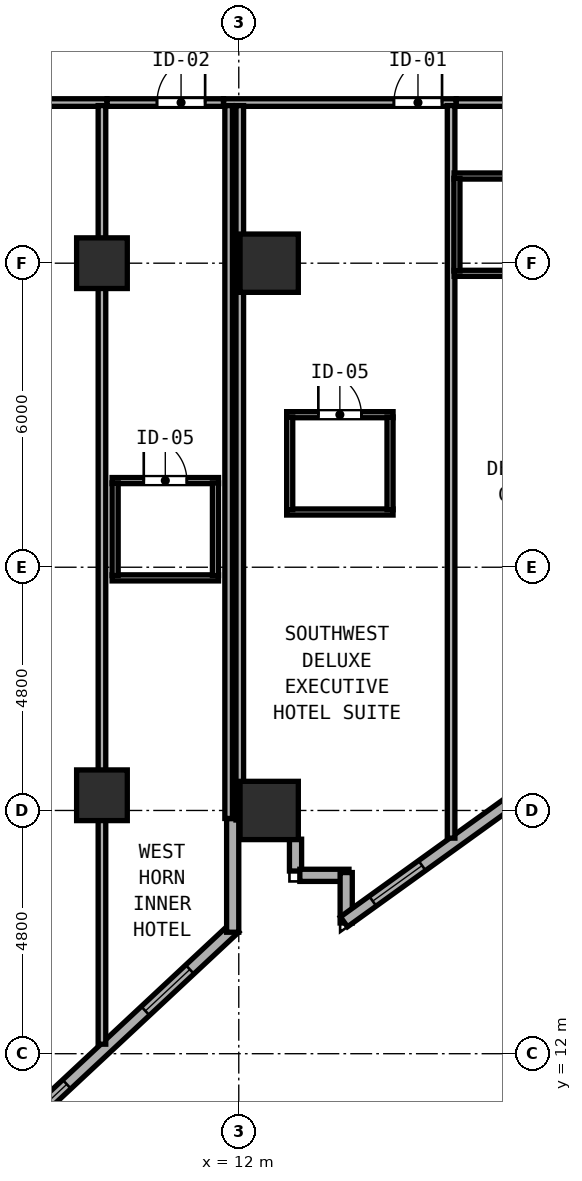
"""IFC4 building model, lengths in metres.
Left out: names, types, materials, properties, quantities, classifications, styles, units other than length and angle.
Written with IfcOpenShell. Run it as: python <this file> out.ifc"""

import sys

from ifc_helpers import new_model, si_unit, direction, frame, frame_2d, origin, origin_2d, place, context, subcontext, project, spatial, rectangle, hollow_rectangle, extrude, element, fill, save


model = new_model("IFC4")
c1 = context("Model", 3, precision=1e-05, world=origin(), true_north=direction((0.0, 1.0)))
c2 = subcontext(c1, "Body", "Model", "MODEL_VIEW")
j1 = project(units=[si_unit("LENGTHUNIT", "METRE"), si_unit("PLANEANGLEUNIT", "RADIAN")], contexts=[c1])
p1 = place(None, origin())
s1 = spatial("IfcSite", under=j1, at=p1, CompositionType="ELEMENT")
p2 = place(p1, origin())
s2 = spatial("IfcBuilding", under=s1, at=p2, CompositionType="ELEMENT")
p3 = place(p2, frame((0.0, 0.0, 81.8)))
s3 = spatial("IfcBuildingStorey", under=s2, at=p3, CompositionType="ELEMENT", Elevation=81.8)
for number, where, z_axis, x_axis in (
    (1, (12.6, 16.8, 0.0), (0.0, 0.0, 1.0), (1.0, 0.0, 0.0)),
    (2, (12.6, 27.6, 0.0), (0.0, 0.0, 1.0), (1.0, 0.0, 0.0)),
):
    element("IfcColumn", number, at=place(p3, frame(where, z_axis=z_axis, x_axis=x_axis)), inside=s3, PredefinedType="COLUMN", context=c2, shape_type="SweptSolid", body=[
        extrude(hollow_rectangle(XDim=1.15, YDim=1.15, WallThickness=0.042, at=origin_2d()), origin(), (0.0, 0.0, 1.0), 3.8),
    ])
for number, where, z_axis, x_axis in (
    (3, (9.3, 17.1, 0.0), (0.0, 0.0, 1.0), (1.0, 0.0, 0.0)),
    (4, (9.3, 27.6, 0.0), (0.0, 0.0, 1.0), (1.0, 0.0, 0.0)),
):
    element("IfcColumn", number, at=place(p3, frame(where, z_axis=z_axis, x_axis=x_axis)), inside=s3, PredefinedType="COLUMN", context=c2, shape_type="SweptSolid", body=[
        extrude(hollow_rectangle(XDim=1.0, YDim=1.0, WallThickness=0.038, at=origin_2d()), origin(), (0.0, 0.0, 1.0), 3.8),
    ])
p4 = place(p3, frame((3.27, 6.416, 0.0), z_axis=(0.0, 0.0, 1.0), x_axis=(0.731064187858, 0.682308693505, 0.0)))
e5 = element("IfcWall", 5, at=p4, inside=s3, PredefinedType="SOLIDWALL", context=c2, shape_type="SweptSolid", body=[
    extrude(rectangle(XDim=11.833, YDim=0.24, at=frame_2d((5.916, 0.0))), origin(), (0.0, 0.0, 1.0), 3.6),
])
p5 = place(p4, frame((0.7, 0.0, 0.85)))
e6 = element("IfcOpeningElement", 6, at=p5, cuts=e5, PredefinedType="OPENING", context=c2, shape_type="SweptSolid", body=[
    extrude(rectangle(XDim=1.2, YDim=1.85, at=frame_2d((0.6, 0.925))), frame((0.0, 0.13, 0.0), z_axis=(0.0, -1.0, 0.0), x_axis=(1.0, 0.0, 0.0)), (0.0, 0.0, 1.0), 0.26),
])
p6 = place(p4, frame((6.1, 0.0, 0.85)))
e7 = element("IfcOpeningElement", 7, at=p6, cuts=e5, PredefinedType="OPENING", context=c2, shape_type="SweptSolid", body=[
    extrude(rectangle(XDim=1.2, YDim=1.85, at=frame_2d((0.6, 0.925))), frame((0.0, 0.13, 0.0), z_axis=(0.0, -1.0, 0.0), x_axis=(1.0, 0.0, 0.0)), (0.0, 0.0, 1.0), 0.26),
])
p7 = place(p4, frame((9.421, 0.0, 0.85)))
e8 = element("IfcOpeningElement", 8, at=p7, cuts=e5, PredefinedType="OPENING", context=c2, shape_type="SweptSolid", body=[
    extrude(rectangle(XDim=1.2, YDim=1.85, at=frame_2d((0.6, 0.925))), frame((0.0, 0.13, 0.0), z_axis=(0.0, -1.0, 0.0), x_axis=(1.0, 0.0, 0.0)), (0.0, 0.0, 1.0), 0.26),
])
p8 = place(p3, frame((11.88, 14.397, 0.0), z_axis=(0.0, 0.0, 1.0), x_axis=(0.0, 1.0, 0.0)))
e9 = element("IfcWall", 9, at=p8, inside=s3, PredefinedType="SOLIDWALL", context=c2, shape_type="SweptSolid", body=[
    extrude(rectangle(XDim=2.243, YDim=0.24, at=frame_2d((1.121, 0.0))), origin(), (0.0, 0.0, 1.0), 3.6),
])
p9 = place(p3, frame((13.12, 16.233, 0.0), z_axis=(0.0, 0.0, 1.0), x_axis=(0.0, -1.0, 0.0)))
e10 = element("IfcWall", 10, at=p9, inside=s3, PredefinedType="SOLIDWALL", context=c2, shape_type="SweptSolid", body=[
    extrude(rectangle(XDim=0.628, YDim=0.24, at=frame_2d((0.314, 0.0))), origin(), (0.0, 0.0, 1.0), 3.6),
])
p10 = place(p3, frame((13.205, 15.52, 0.0), z_axis=(0.0, 0.0, 1.0), x_axis=(1.0, 0.0, 0.0)))
e11 = element("IfcWall", 11, at=p10, inside=s3, PredefinedType="SOLIDWALL", context=c2, shape_type="SweptSolid", body=[
    extrude(rectangle(XDim=0.97, YDim=0.24, at=frame_2d((0.485, 0.0))), origin(), (0.0, 0.0, 1.0), 3.6),
])
p11 = place(p3, frame((14.12, 15.575, 0.0), z_axis=(0.0, 0.0, 1.0), x_axis=(0.0, -1.0, 0.0)))
e12 = element("IfcWall", 12, at=p11, inside=s3, PredefinedType="SOLIDWALL", context=c2, shape_type="SweptSolid", body=[
    extrude(rectangle(XDim=0.996, YDim=0.24, at=frame_2d((0.498, 0.0))), origin(), (0.0, 0.0, 1.0), 3.6),
])
p12 = place(p3, frame((14.075, 14.602, 0.0), z_axis=(0.0, 0.0, 1.0), x_axis=(0.811543176492, 0.58429245476, 0.0)))
e13 = element("IfcWall", 13, at=p12, inside=s3, PredefinedType="SOLIDWALL", context=c2, shape_type="SweptSolid", body=[
    extrude(rectangle(XDim=11.531, YDim=0.24, at=frame_2d((5.765, 0.0))), origin(), (0.0, 0.0, 1.0), 3.097),
])
p13 = place(p12, frame((0.7, 0.0, 0.85)))
e14 = element("IfcOpeningElement", 14, at=p13, cuts=e13, PredefinedType="OPENING", context=c2, shape_type="SweptSolid", body=[
    extrude(rectangle(XDim=1.2, YDim=1.85, at=frame_2d((0.6, 0.925))), frame((0.0, 0.13, 0.0), z_axis=(0.0, -1.0, 0.0), x_axis=(1.0, 0.0, 0.0)), (0.0, 0.0, 1.0), 0.26),
])
p14 = place(p12, frame((6.1, 0.0, 0.85)))
e15 = element("IfcOpeningElement", 15, at=p14, cuts=e13, PredefinedType="OPENING", context=c2, shape_type="SweptSolid", body=[
    extrude(rectangle(XDim=1.2, YDim=1.85, at=frame_2d((0.6, 0.925))), frame((0.0, 0.13, 0.0), z_axis=(0.0, -1.0, 0.0), x_axis=(1.0, 0.0, 0.0)), (0.0, 0.0, 1.0), 0.26),
])
p15 = place(p12, frame((9.07, 0.0, 0.85)))
e16 = element("IfcOpeningElement", 16, at=p15, cuts=e13, PredefinedType="OPENING", context=c2, shape_type="SweptSolid", body=[
    extrude(rectangle(XDim=1.2, YDim=1.85, at=frame_2d((0.6, 0.925))), frame((0.0, 0.13, 0.0), z_axis=(0.0, -1.0, 0.0), x_axis=(1.0, 0.0, 0.0)), (0.0, 0.0, 1.0), 0.26),
])
p16 = place(p3, frame((12.173, 33.524, 0.0), z_axis=(0.0, 0.0, 1.0), x_axis=(-0.963197271032, -0.268795493036, 0.0)))
e17 = element("IfcWall", 17, at=p16, inside=s3, PredefinedType="SOLIDWALL", context=c2, shape_type="SweptSolid", body=[
    extrude(rectangle(XDim=9.095, YDim=0.24, at=frame_2d((4.548, 0.0))), origin(), (0.0, 0.0, 1.0), 3.6),
])
p17 = place(p16, frame((0.7, 0.0, 0.85)))
e18 = element("IfcOpeningElement", 18, at=p17, cuts=e17, PredefinedType="OPENING", context=c2, shape_type="SweptSolid", body=[
    extrude(rectangle(XDim=1.2, YDim=1.85, at=frame_2d((0.6, 0.925))), frame((0.0, 0.13, 0.0), z_axis=(0.0, -1.0, 0.0), x_axis=(1.0, 0.0, 0.0)), (0.0, 0.0, 1.0), 0.26),
])
p18 = place(p16, frame((6.1, 0.0, 0.85)))
e19 = element("IfcOpeningElement", 19, at=p18, cuts=e17, PredefinedType="OPENING", context=c2, shape_type="SweptSolid", body=[
    extrude(rectangle(XDim=1.2, YDim=1.85, at=frame_2d((0.6, 0.925))), frame((0.0, 0.13, 0.0), z_axis=(0.0, -1.0, 0.0), x_axis=(1.0, 0.0, 0.0)), (0.0, 0.0, 1.0), 0.26),
])
p19 = place(p3, frame((11.7, 30.77, 0.0), z_axis=(0.0, 0.0, 1.0), x_axis=(1.0, 0.0, 0.0)))
e20 = element("IfcWall", 20, at=p19, inside=s3, PredefinedType="PARTITIONING", context=c2, shape_type="SweptSolid", body=[
    extrude(rectangle(XDim=4.59, YDim=0.15, at=frame_2d((2.295, 0.0))), origin(), (0.0, 0.0, 1.0), 3.6),
])
p20 = place(p19, frame((4.311, 0.0, 0.0), z_axis=(0.0, 0.0, 1.0), x_axis=(-1.0, 0.0, 0.0)))
e21 = element("IfcOpeningElement", 21, at=p20, cuts=e20, PredefinedType="OPENING", context=c2, shape_type="SweptSolid", body=[
    extrude(rectangle(XDim=0.95, YDim=2.18, at=frame_2d((0.475, 1.09))), frame((0.0, 0.085, 0.0), z_axis=(0.0, -1.0, 0.0), x_axis=(1.0, 0.0, 0.0)), (0.0, 0.0, 1.0), 0.17),
])
p21 = place(p3, frame((11.8, 16.642, 0.0), z_axis=(0.0, 0.0, 1.0), x_axis=(0.0, 1.0, 0.0)))
e22 = element("IfcWall", 22, at=p21, inside=s3, PredefinedType="PARTITIONING", context=c2, shape_type="SweptSolid", body=[
    extrude(rectangle(XDim=14.068, YDim=0.15, at=frame_2d((7.034, 0.0))), origin(), (0.0, 0.0, 1.0), 3.6),
])
p22 = place(p3, frame((16.19, 16.254, 0.0), z_axis=(0.0, 0.0, 1.0), x_axis=(0.0, 1.0, 0.0)))
e23 = element("IfcWall", 23, at=p22, inside=s3, PredefinedType="PARTITIONING", context=c2, shape_type="SweptSolid", body=[
    extrude(rectangle(XDim=14.456, YDim=0.15, at=frame_2d((7.228, 0.0))), origin(), (0.0, 0.0, 1.0), 3.6),
])
p23 = place(p3, frame((12.945, 24.61, 0.0), z_axis=(0.0, 0.0, 1.0), x_axis=(1.0, 0.0, 0.0)))
e24 = element("IfcWall", 24, at=p23, inside=s3, PredefinedType="PARTITIONING", context=c2, shape_type="SweptSolid", body=[
    extrude(rectangle(XDim=2.1, YDim=0.12, at=frame_2d((1.05, 0.0))), origin(), (0.0, 0.0, 1.0), 3.6),
])
p24 = place(p23, frame((1.475, 0.0, 0.0), z_axis=(0.0, 0.0, 1.0), x_axis=(-1.0, 0.0, 0.0)))
e25 = element("IfcOpeningElement", 25, at=p24, cuts=e24, PredefinedType="OPENING", context=c2, shape_type="SweptSolid", body=[
    extrude(rectangle(XDim=0.85, YDim=2.1, at=frame_2d((0.425, 1.05))), frame((0.0, 0.07, 0.0), z_axis=(0.0, -1.0, 0.0), x_axis=(1.0, 0.0, 0.0)), (0.0, 0.0, 1.0), 0.14),
])
p25 = place(p3, frame((12.945, 22.69, 0.0), z_axis=(0.0, 0.0, 1.0), x_axis=(1.0, 0.0, 0.0)))
e26 = element("IfcWall", 26, at=p25, inside=s3, PredefinedType="PARTITIONING", context=c2, shape_type="SweptSolid", body=[
    extrude(rectangle(XDim=2.1, YDim=0.12, at=frame_2d((1.05, 0.0))), origin(), (0.0, 0.0, 1.0), 3.6),
])
for number, where, z_axis, x_axis in (
    (27, (13.005, 22.735, 0.0), (0.0, 0.0, 1.0), (0.0, 1.0, 0.0)),
    (28, (14.985, 22.735, 0.0), (0.0, 0.0, 1.0), (0.0, 1.0, 0.0)),
):
    element("IfcWall", number, at=place(p3, frame(where, z_axis=z_axis, x_axis=x_axis)), inside=s3, PredefinedType="PARTITIONING", context=c2, shape_type="SweptSolid", body=[
        extrude(rectangle(XDim=1.83, YDim=0.12, at=frame_2d((0.915, 0.0))), origin(), (0.0, 0.0, 1.0), 3.6),
    ])
p26 = place(p3, frame((16.292, 30.77, 0.0), z_axis=(0.0, 0.0, 1.0), x_axis=(1.0, 0.0, 0.0)))
e29 = element("IfcWall", 29, at=p26, inside=s3, PredefinedType="PARTITIONING", context=c2, shape_type="SweptSolid", body=[
    extrude(rectangle(XDim=4.148, YDim=0.15, at=frame_2d((2.074, 0.0))), origin(), (0.0, 0.0, 1.0), 3.6),
])
p27 = place(p26, frame((3.885, 0.0, 0.0), z_axis=(0.0, 0.0, 1.0), x_axis=(-1.0, 0.0, 0.0)))
e30 = element("IfcOpeningElement", 30, at=p27, cuts=e29, PredefinedType="OPENING", context=c2, shape_type="SweptSolid", body=[
    extrude(rectangle(XDim=0.95, YDim=2.15, at=frame_2d((0.475, 1.075))), frame((0.0, 0.085, 0.0), z_axis=(0.0, -1.0, 0.0), x_axis=(1.0, 0.0, 0.0)), (0.0, 0.0, 1.0), 0.17),
])
p28 = place(p3, frame((16.25, 29.32, 0.0), z_axis=(0.0, 0.0, 1.0), x_axis=(1.0, 0.0, 0.0)))
e31 = element("IfcWall", 31, at=p28, inside=s3, PredefinedType="PARTITIONING", context=c2, shape_type="SweptSolid", body=[
    extrude(rectangle(XDim=2.095, YDim=0.12, at=frame_2d((1.047, 0.0))), origin(), (0.0, 0.0, 1.0), 3.6),
])
p29 = place(p3, frame((16.25, 27.4, 0.0), z_axis=(0.0, 0.0, 1.0), x_axis=(1.0, 0.0, 0.0)))
e32 = element("IfcWall", 32, at=p29, inside=s3, PredefinedType="PARTITIONING", context=c2, shape_type="SweptSolid", body=[
    extrude(rectangle(XDim=2.095, YDim=0.12, at=frame_2d((1.047, 0.0))), origin(), (0.0, 0.0, 1.0), 3.097),
])
p30 = place(p3, frame((16.305, 27.445, 0.0), z_axis=(0.0, 0.0, 1.0), x_axis=(0.0, 1.0, 0.0)))
e33 = element("IfcWall", 33, at=p30, inside=s3, PredefinedType="PARTITIONING", context=c2, shape_type="SweptSolid", body=[
    extrude(rectangle(XDim=1.83, YDim=0.12, at=frame_2d((0.915, 0.0))), origin(), (0.0, 0.0, 1.0), 3.6),
])
p31 = place(p3, frame((3.311, 30.77, 0.0), z_axis=(0.0, 0.0, 1.0), x_axis=(1.0, 0.0, 0.0)))
e34 = element("IfcWall", 34, at=p31, inside=s3, PredefinedType="PARTITIONING", context=c2, shape_type="SweptSolid", body=[
    extrude(rectangle(XDim=6.089, YDim=0.15, at=frame_2d((3.044, 0.0))), origin(), (0.0, 0.0, 1.0), 3.6),
])
p32 = place(p31, frame((4.801, 0.0, 0.0), z_axis=(0.0, 0.0, 1.0), x_axis=(-1.0, 0.0, 0.0)))
e35 = element("IfcOpeningElement", 35, at=p32, cuts=e34, PredefinedType="OPENING", context=c2, shape_type="SweptSolid", body=[
    extrude(rectangle(XDim=0.95, YDim=2.18, at=frame_2d((0.475, 1.09))), frame((0.0, 0.085, 0.0), z_axis=(0.0, -1.0, 0.0), x_axis=(1.0, 0.0, 0.0)), (0.0, 0.0, 1.0), 0.17),
])
p33 = place(p3, frame((9.3, 12.188, 0.0), z_axis=(0.0, 0.0, 1.0), x_axis=(0.0, 1.0, 0.0)))
e36 = element("IfcWall", 36, at=p33, inside=s3, PredefinedType="PARTITIONING", context=c2, shape_type="SweptSolid", body=[
    extrude(rectangle(XDim=18.522, YDim=0.15, at=frame_2d((9.261, 0.0))), origin(), (0.0, 0.0, 1.0), 3.6),
])
p34 = place(p3, frame((9.402, 30.77, 0.0), z_axis=(0.0, 0.0, 1.0), x_axis=(1.0, 0.0, 0.0)))
e37 = element("IfcWall", 37, at=p34, inside=s3, PredefinedType="PARTITIONING", context=c2, shape_type="SweptSolid", body=[
    extrude(rectangle(XDim=2.296, YDim=0.15, at=frame_2d((1.148, 0.0))), origin(), (0.0, 0.0, 1.0), 3.6),
])
p35 = place(p34, frame((1.934, 0.0, 0.0), z_axis=(0.0, 0.0, 1.0), x_axis=(-1.0, 0.0, 0.0)))
e38 = element("IfcOpeningElement", 38, at=p35, cuts=e37, PredefinedType="OPENING", context=c2, shape_type="SweptSolid", body=[
    extrude(rectangle(XDim=0.95, YDim=2.15, at=frame_2d((0.475, 1.075))), frame((0.0, 0.085, 0.0), z_axis=(0.0, -1.0, 0.0), x_axis=(1.0, 0.0, 0.0)), (0.0, 0.0, 1.0), 0.17),
])
p36 = place(p3, frame((12.02, 16.612, 0.0), z_axis=(0.0, 0.0, 1.0), x_axis=(0.0, 1.0, 0.0)))
e39 = element("IfcWall", 39, at=p36, inside=s3, PredefinedType="PARTITIONING", context=c2, shape_type="SweptSolid", body=[
    extrude(rectangle(XDim=14.098, YDim=0.15, at=frame_2d((7.049, 0.0))), origin(), (0.0, 0.0, 1.0), 3.6),
])
p37 = place(p3, frame((9.5, 23.31, 0.0), z_axis=(0.0, 0.0, 1.0), x_axis=(1.0, 0.0, 0.0)))
e40 = element("IfcWall", 40, at=p37, inside=s3, PredefinedType="PARTITIONING", context=c2, shape_type="SweptSolid", body=[
    extrude(rectangle(XDim=2.1, YDim=0.12, at=frame_2d((1.05, 0.0))), origin(), (0.0, 0.0, 1.0), 3.6),
])
p38 = place(p37, frame((1.475, 0.0, 0.0), z_axis=(0.0, 0.0, 1.0), x_axis=(-1.0, 0.0, 0.0)))
e41 = element("IfcOpeningElement", 41, at=p38, cuts=e40, PredefinedType="OPENING", context=c2, shape_type="SweptSolid", body=[
    extrude(rectangle(XDim=0.85, YDim=2.1, at=frame_2d((0.425, 1.05))), frame((0.0, 0.07, 0.0), z_axis=(0.0, -1.0, 0.0), x_axis=(1.0, 0.0, 0.0)), (0.0, 0.0, 1.0), 0.14),
])
p39 = place(p3, frame((9.5, 21.39, 0.0), z_axis=(0.0, 0.0, 1.0), x_axis=(1.0, 0.0, 0.0)))
e42 = element("IfcWall", 42, at=p39, inside=s3, PredefinedType="PARTITIONING", context=c2, shape_type="SweptSolid", body=[
    extrude(rectangle(XDim=2.1, YDim=0.12, at=frame_2d((1.05, 0.0))), origin(), (0.0, 0.0, 1.0), 3.6),
])
for number, where, z_axis, x_axis in (
    (43, (9.56, 21.435, 0.0), (0.0, 0.0, 1.0), (0.0, 1.0, 0.0)),
    (44, (11.54, 21.435, 0.0), (0.0, 0.0, 1.0), (0.0, 1.0, 0.0)),
):
    element("IfcWall", number, at=place(p3, frame(where, z_axis=z_axis, x_axis=x_axis)), inside=s3, PredefinedType="PARTITIONING", context=c2, shape_type="SweptSolid", body=[
        extrude(rectangle(XDim=1.83, YDim=0.12, at=frame_2d((0.915, 0.0))), origin(), (0.0, 0.0, 1.0), 3.6),
    ])
p40 = place(p6, origin())
e45 = element("IfcWindow", 45, at=p40, inside=s3, PartitioningType="SINGLE_PANEL", PredefinedType="WINDOW", context=c2, shape_type="SweptSolid", body=[
    extrude(rectangle(XDim=1.2, YDim=1.85, at=frame_2d((0.6, 0.925))), frame((0.0, 0.03, 0.0), z_axis=(0.0, -1.0, 0.0), x_axis=(1.0, 0.0, 0.0)), (0.0, 0.0, 1.0), 0.06),
])
fill(e7, e45)
p41 = place(p13, origin())
e46 = element("IfcWindow", 46, at=p41, inside=s3, PartitioningType="SINGLE_PANEL", PredefinedType="WINDOW", context=c2, shape_type="SweptSolid", body=[
    extrude(rectangle(XDim=1.2, YDim=1.85, at=frame_2d((0.6, 0.925))), frame((0.0, 0.03, 0.0), z_axis=(0.0, -1.0, 0.0), x_axis=(1.0, 0.0, 0.0)), (0.0, 0.0, 1.0), 0.06),
])
fill(e14, e46)
p42 = place(p20, origin())
e47 = element("IfcDoor", 47, at=p42, inside=s3, OperationType="SINGLE_SWING_LEFT", PredefinedType="DOOR", context=c2, shape_type="SweptSolid", body=[
    extrude(rectangle(XDim=0.95, YDim=2.18, at=frame_2d((0.475, 1.09))), frame((0.0, 0.025, 0.0), z_axis=(0.0, -1.0, 0.0), x_axis=(1.0, 0.0, 0.0)), (0.0, 0.0, 1.0), 0.05),
])
fill(e21, e47)
p43 = place(p24, origin())
e48 = element("IfcDoor", 48, at=p43, inside=s3, OperationType="SINGLE_SWING_RIGHT", PredefinedType="DOOR", context=c2, shape_type="SweptSolid", body=[
    extrude(rectangle(XDim=0.85, YDim=2.1, at=frame_2d((0.425, 1.05))), frame((0.0, 0.025, 0.0), z_axis=(0.0, -1.0, 0.0), x_axis=(1.0, 0.0, 0.0)), (0.0, 0.0, 1.0), 0.05),
])
fill(e25, e48)
p44 = place(p35, origin())
e49 = element("IfcDoor", 49, at=p44, inside=s3, OperationType="SINGLE_SWING_LEFT", PredefinedType="DOOR", context=c2, shape_type="SweptSolid", body=[
    extrude(rectangle(XDim=0.95, YDim=2.15, at=frame_2d((0.475, 1.075))), frame((0.0, 0.025, 0.0), z_axis=(0.0, -1.0, 0.0), x_axis=(1.0, 0.0, 0.0)), (0.0, 0.0, 1.0), 0.05),
])
fill(e38, e49)
p45 = place(p38, origin())
e50 = element("IfcDoor", 50, at=p45, inside=s3, OperationType="SINGLE_SWING_RIGHT", PredefinedType="DOOR", context=c2, shape_type="SweptSolid", body=[
    extrude(rectangle(XDim=0.85, YDim=2.1, at=frame_2d((0.425, 1.05))), frame((0.0, 0.025, 0.0), z_axis=(0.0, -1.0, 0.0), x_axis=(1.0, 0.0, 0.0)), (0.0, 0.0, 1.0), 0.05),
])
fill(e41, e50)
p46 = place(p7, origin())
e51 = element("IfcWindow", 51, at=p46, inside=s3, PartitioningType="SINGLE_PANEL", PredefinedType="WINDOW", context=c2, shape_type="SweptSolid", body=[
    extrude(rectangle(XDim=1.2, YDim=1.85, at=frame_2d((0.6, 0.925))), frame((0.0, 0.03, 0.0), z_axis=(0.0, -1.0, 0.0), x_axis=(1.0, 0.0, 0.0)), (0.0, 0.0, 1.0), 0.06),
])
fill(e8, e51)
save(model, sys.argv[1])
